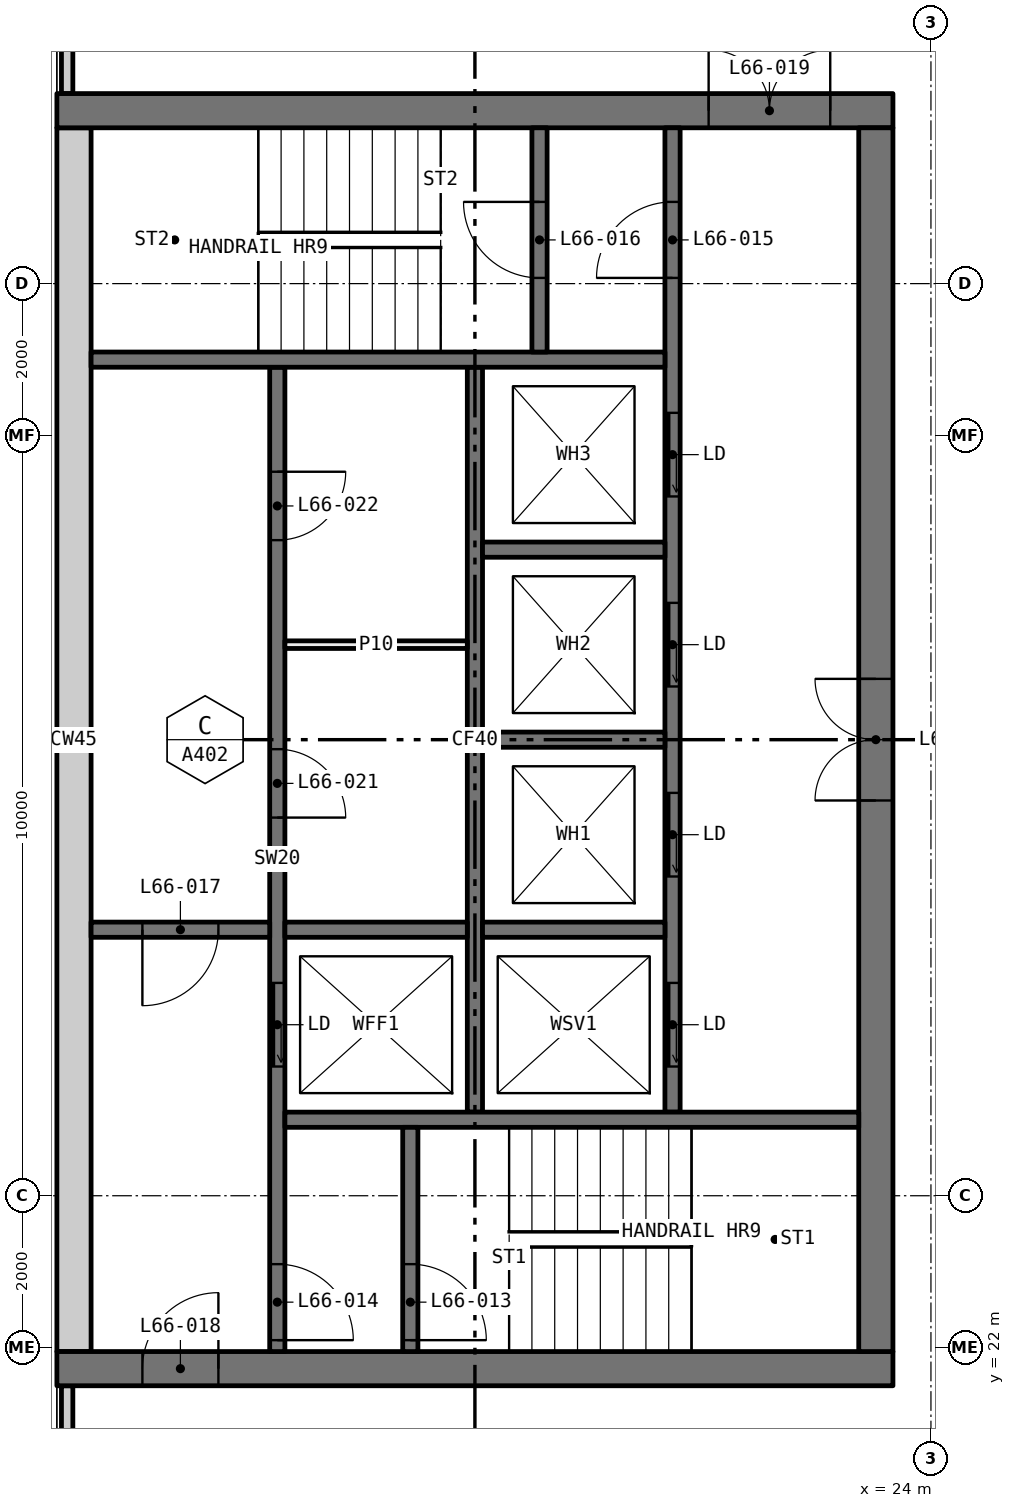
"""IFC4 building model, lengths in metres.
Left out: names, types, materials, properties, quantities, classifications, styles, units other than length and angle.
Written with IfcOpenShell. Run it as: python <this file> out.ifc"""

import sys

from ifc_helpers import new_model, si_unit, direction, frame, frame_2d, origin, place, context, subcontext, project, spatial, rectangle, extrude, element, fill, save


model = new_model("IFC4")
c1 = context("Model", 3, precision=1e-05, world=origin(), true_north=direction((0.0, 1.0)))
c2 = subcontext(c1, "Body", "Model", "MODEL_VIEW")
j1 = project(units=[si_unit("LENGTHUNIT", "METRE"), si_unit("PLANEANGLEUNIT", "RADIAN")], contexts=[c1])
p1 = place(None, origin())
s1 = spatial("IfcSite", under=j1, at=p1, CompositionType="ELEMENT")
p2 = place(p1, origin())
s2 = spatial("IfcBuilding", under=s1, at=p2, CompositionType="ELEMENT")
p3 = place(p2, frame((0.0, 0.0, 245.55)))
s3 = spatial("IfcBuildingStorey", under=s2, at=p3, CompositionType="ELEMENT", Elevation=245.55)
for number, where, z_axis, x_axis in (
    (1, (12.635, 18.71, 0.0), (0.0, 0.0, 1.0), (0.0, 1.0, 0.0)),
    (2, (12.635, 38.5, 0.0), (0.0, 0.0, 1.0), (0.0, 1.0, 0.0)),
):
    element("IfcWall", number, at=place(p3, frame(where, z_axis=z_axis, x_axis=x_axis)), inside=s3, PredefinedType="ELEMENTEDWALL", context=c2, shape_type="SweptSolid", body=[
        extrude(rectangle(XDim=2.79, YDim=0.15, at=frame_2d((1.395, 0.0))), origin(), (0.0, 0.0, 1.0), 3.05),
    ])
p4 = place(p3, frame((12.5, 21.725, 0.0), z_axis=(0.0, 0.0, 1.0), x_axis=(1.0, 0.0, 0.0)))
e3 = element("IfcWall", 3, at=p4, inside=s3, PredefinedType="SHEAR", context=c2, shape_type="SweptSolid", body=[
    extrude(rectangle(XDim=11.0, YDim=0.45, at=frame_2d((5.5, 0.0))), origin(), (0.0, 0.0, 1.0), 3.05),
])
p5 = place(p4, frame((1.125, 0.0, 0.0)))
e4 = element("IfcOpeningElement", 4, at=p5, cuts=e3, PredefinedType="OPENING", context=c2, shape_type="SweptSolid", body=[
    extrude(rectangle(XDim=1.0, YDim=2.1, at=frame_2d((0.5, 1.05))), frame((0.0, 0.235, 0.0), z_axis=(0.0, -1.0, 0.0), x_axis=(1.0, 0.0, 0.0)), (0.0, 0.0, 1.0), 0.47),
])
p6 = place(p3, frame((12.5, 38.275, 0.0), z_axis=(0.0, 0.0, 1.0), x_axis=(1.0, 0.0, 0.0)))
e5 = element("IfcWall", 5, at=p6, inside=s3, PredefinedType="SHEAR", context=c2, shape_type="SweptSolid", body=[
    extrude(rectangle(XDim=11.0, YDim=0.45, at=frame_2d((5.5, 0.0))), origin(), (0.0, 0.0, 1.0), 3.05),
])
p7 = place(p6, frame((8.575, 0.0, 0.0)))
e6 = element("IfcOpeningElement", 6, at=p7, cuts=e5, PredefinedType="OPENING", context=c2, shape_type="SweptSolid", body=[
    extrude(rectangle(XDim=1.6, YDim=2.1, at=frame_2d((0.8, 1.05))), frame((0.0, 0.235, 0.0), z_axis=(0.0, -1.0, 0.0), x_axis=(1.0, 0.0, 0.0)), (0.0, 0.0, 1.0), 0.47),
])
p8 = place(p3, frame((12.725, 21.95, 0.0), z_axis=(0.0, 0.0, 1.0), x_axis=(0.0, 1.0, 0.0)))
e7 = element("IfcWall", 7, at=p8, inside=s3, PredefinedType="SHEAR", context=c2, shape_type="SweptSolid", body=[
    extrude(rectangle(XDim=16.1, YDim=0.45, at=frame_2d((8.05, 0.0))), origin(), (0.0, 0.0, 1.0), 3.05),
])
p9 = place(p3, frame((23.275, 21.95, 0.0), z_axis=(0.0, 0.0, 1.0), x_axis=(0.0, 1.0, 0.0)))
e8 = element("IfcWall", 8, at=p9, inside=s3, PredefinedType="SHEAR", context=c2, shape_type="SweptSolid", body=[
    extrude(rectangle(XDim=16.1, YDim=0.45, at=frame_2d((8.05, 0.0))), origin(), (0.0, 0.0, 1.0), 3.05),
])
p10 = place(p9, frame((7.25, 0.0, 0.0)))
e9 = element("IfcOpeningElement", 9, at=p10, cuts=e8, PredefinedType="OPENING", context=c2, shape_type="SweptSolid", body=[
    extrude(rectangle(XDim=1.6, YDim=2.1, at=frame_2d((0.8, 1.05))), frame((0.0, 0.235, 0.0), z_axis=(0.0, -1.0, 0.0), x_axis=(1.0, 0.0, 0.0)), (0.0, 0.0, 1.0), 0.47),
])
p11 = place(p3, frame((15.4, 21.95, 0.0), z_axis=(0.0, 0.0, 1.0), x_axis=(0.0, 1.0, 0.0)))
e10 = element("IfcWall", 10, at=p11, inside=s3, PredefinedType="SOLIDWALL", context=c2, shape_type="SweptSolid", body=[
    extrude(rectangle(XDim=12.95, YDim=0.2, at=frame_2d((6.475, 0.0))), origin(), (0.0, 0.0, 1.0), 3.05),
])
p12 = place(p11, frame((3.75, 0.0, 0.0)))
e11 = element("IfcOpeningElement", 11, at=p12, cuts=e10, PredefinedType="OPENING", context=c2, shape_type="SweptSolid", body=[
    extrude(rectangle(XDim=1.1, YDim=2.1, at=frame_2d((0.55, 1.05))), frame((0.0, 0.11, 0.0), z_axis=(0.0, -1.0, 0.0), x_axis=(1.0, 0.0, 0.0)), (0.0, 0.0, 1.0), 0.22),
])
p13 = place(p11, frame((0.15, 0.0, 0.0)))
e12 = element("IfcOpeningElement", 12, at=p13, cuts=e10, PredefinedType="OPENING", context=c2, shape_type="SweptSolid", body=[
    extrude(rectangle(XDim=1.0, YDim=2.1, at=frame_2d((0.5, 1.05))), frame((0.0, 0.11, 0.0), z_axis=(0.0, -1.0, 0.0), x_axis=(1.0, 0.0, 0.0)), (0.0, 0.0, 1.0), 0.22),
])
p14 = place(p11, frame((7.025, 0.0, 0.0)))
e13 = element("IfcOpeningElement", 13, at=p14, cuts=e10, PredefinedType="OPENING", context=c2, shape_type="SweptSolid", body=[
    extrude(rectangle(XDim=0.9, YDim=2.1, at=frame_2d((0.45, 1.05))), frame((0.0, 0.11, 0.0), z_axis=(0.0, -1.0, 0.0), x_axis=(1.0, 0.0, 0.0)), (0.0, 0.0, 1.0), 0.22),
])
p15 = place(p11, frame((10.675, 0.0, 0.0)))
e14 = element("IfcOpeningElement", 14, at=p15, cuts=e10, PredefinedType="OPENING", context=c2, shape_type="SweptSolid", body=[
    extrude(rectangle(XDim=0.9, YDim=2.1, at=frame_2d((0.45, 1.05))), frame((0.0, 0.11, 0.0), z_axis=(0.0, -1.0, 0.0), x_axis=(1.0, 0.0, 0.0)), (0.0, 0.0, 1.0), 0.22),
])
p16 = place(p3, frame((20.6, 25.1, 0.0), z_axis=(0.0, 0.0, 1.0), x_axis=(0.0, 1.0, 0.0)))
e15 = element("IfcWall", 15, at=p16, inside=s3, PredefinedType="SOLIDWALL", context=c2, shape_type="SweptSolid", body=[
    extrude(rectangle(XDim=12.95, YDim=0.2, at=frame_2d((6.475, 0.0))), origin(), (0.0, 0.0, 1.0), 3.05),
])
p17 = place(p16, frame((0.6, 0.0, 0.0)))
e16 = element("IfcOpeningElement", 16, at=p17, cuts=e15, PredefinedType="OPENING", context=c2, shape_type="SweptSolid", body=[
    extrude(rectangle(XDim=1.1, YDim=2.1, at=frame_2d((0.55, 1.05))), frame((0.0, 0.11, 0.0), z_axis=(0.0, -1.0, 0.0), x_axis=(1.0, 0.0, 0.0)), (0.0, 0.0, 1.0), 0.22),
])
p18 = place(p16, frame((3.1, 0.0, 0.0)))
e17 = element("IfcOpeningElement", 17, at=p18, cuts=e15, PredefinedType="OPENING", context=c2, shape_type="SweptSolid", body=[
    extrude(rectangle(XDim=1.1, YDim=2.1, at=frame_2d((0.55, 1.05))), frame((0.0, 0.11, 0.0), z_axis=(0.0, -1.0, 0.0), x_axis=(1.0, 0.0, 0.0)), (0.0, 0.0, 1.0), 0.22),
])
p19 = place(p16, frame((5.6, 0.0, 0.0)))
e18 = element("IfcOpeningElement", 18, at=p19, cuts=e15, PredefinedType="OPENING", context=c2, shape_type="SweptSolid", body=[
    extrude(rectangle(XDim=1.1, YDim=2.1, at=frame_2d((0.55, 1.05))), frame((0.0, 0.11, 0.0), z_axis=(0.0, -1.0, 0.0), x_axis=(1.0, 0.0, 0.0)), (0.0, 0.0, 1.0), 0.22),
])
p20 = place(p16, frame((8.1, 0.0, 0.0)))
e19 = element("IfcOpeningElement", 19, at=p20, cuts=e15, PredefinedType="OPENING", context=c2, shape_type="SweptSolid", body=[
    extrude(rectangle(XDim=1.1, YDim=2.1, at=frame_2d((0.55, 1.05))), frame((0.0, 0.11, 0.0), z_axis=(0.0, -1.0, 0.0), x_axis=(1.0, 0.0, 0.0)), (0.0, 0.0, 1.0), 0.22),
])
p21 = place(p16, frame((10.975, 0.0, 0.0)))
e20 = element("IfcOpeningElement", 20, at=p21, cuts=e15, PredefinedType="OPENING", context=c2, shape_type="SweptSolid", body=[
    extrude(rectangle(XDim=1.0, YDim=2.1, at=frame_2d((0.5, 1.05))), frame((0.0, 0.11, 0.0), z_axis=(0.0, -1.0, 0.0), x_axis=(1.0, 0.0, 0.0)), (0.0, 0.0, 1.0), 0.22),
])
p22 = place(p3, frame((18.0, 25.1, 0.0), z_axis=(0.0, 0.0, 1.0), x_axis=(0.0, 1.0, 0.0)))
e21 = element("IfcWall", 21, at=p22, inside=s3, PredefinedType="SOLIDWALL", context=c2, shape_type="SweptSolid", body=[
    extrude(rectangle(XDim=9.8, YDim=0.2, at=frame_2d((4.9, 0.0))), origin(), (0.0, 0.0, 1.0), 3.05),
])
for number, where, z_axis, x_axis in (
    (22, (15.5, 25.0, 0.0), (0.0, 0.0, 1.0), (1.0, 0.0, 0.0)),
    (23, (12.95, 35.0, 0.0), (0.0, 0.0, 1.0), (1.0, 0.0, 0.0)),
):
    element("IfcWall", number, at=place(p3, frame(where, z_axis=z_axis, x_axis=x_axis)), inside=s3, PredefinedType="SOLIDWALL", context=c2, shape_type="SweptSolid", body=[
        extrude(rectangle(XDim=7.55, YDim=0.2, at=frame_2d((3.775, 0.0))), origin(), (0.0, 0.0, 1.0), 3.05),
    ])
p23 = place(p3, frame((12.95, 27.5, 0.0), z_axis=(0.0, 0.0, 1.0), x_axis=(1.0, 0.0, 0.0)))
e24 = element("IfcWall", 24, at=p23, inside=s3, PredefinedType="SOLIDWALL", context=c2, shape_type="SweptSolid", body=[
    extrude(rectangle(XDim=2.35, YDim=0.2, at=frame_2d((1.175, 0.0))), origin(), (0.0, 0.0, 1.0), 3.05),
])
p24 = place(p23, frame((0.675, 0.0, 0.0)))
e25 = element("IfcOpeningElement", 25, at=p24, cuts=e24, PredefinedType="OPENING", context=c2, shape_type="SweptSolid", body=[
    extrude(rectangle(XDim=1.0, YDim=2.1, at=frame_2d((0.5, 1.05))), frame((0.0, 0.11, 0.0), z_axis=(0.0, -1.0, 0.0), x_axis=(1.0, 0.0, 0.0)), (0.0, 0.0, 1.0), 0.22),
])
p25 = place(p3, frame((17.15, 21.95, 0.0), z_axis=(0.0, 0.0, 1.0), x_axis=(0.0, 1.0, 0.0)))
e26 = element("IfcWall", 26, at=p25, inside=s3, PredefinedType="SOLIDWALL", context=c2, shape_type="SweptSolid", body=[
    extrude(rectangle(XDim=2.95, YDim=0.2, at=frame_2d((1.475, 0.0))), origin(), (0.0, 0.0, 1.0), 3.05),
])
p26 = place(p25, frame((0.15, 0.0, 0.0)))
e27 = element("IfcOpeningElement", 27, at=p26, cuts=e26, PredefinedType="OPENING", context=c2, shape_type="SweptSolid", body=[
    extrude(rectangle(XDim=1.0, YDim=2.1, at=frame_2d((0.5, 1.05))), frame((0.0, 0.11, 0.0), z_axis=(0.0, -1.0, 0.0), x_axis=(1.0, 0.0, 0.0)), (0.0, 0.0, 1.0), 0.22),
])
p27 = place(p3, frame((18.85, 35.1, 0.0), z_axis=(0.0, 0.0, 1.0), x_axis=(0.0, 1.0, 0.0)))
e28 = element("IfcWall", 28, at=p27, inside=s3, PredefinedType="SOLIDWALL", context=c2, shape_type="SweptSolid", body=[
    extrude(rectangle(XDim=2.95, YDim=0.2, at=frame_2d((1.475, 0.0))), origin(), (0.0, 0.0, 1.0), 3.05),
])
p28 = place(p27, frame((0.975, 0.0, 0.0)))
e29 = element("IfcOpeningElement", 29, at=p28, cuts=e28, PredefinedType="OPENING", context=c2, shape_type="SweptSolid", body=[
    extrude(rectangle(XDim=1.0, YDim=2.1, at=frame_2d((0.5, 1.05))), frame((0.0, 0.11, 0.0), z_axis=(0.0, -1.0, 0.0), x_axis=(1.0, 0.0, 0.0)), (0.0, 0.0, 1.0), 0.22),
])
for number, where, z_axis, x_axis in (
    (30, (15.5, 27.5, 0.0), (0.0, 0.0, 1.0), (1.0, 0.0, 0.0)),
    (31, (18.1, 27.5, 0.0), (0.0, 0.0, 1.0), (1.0, 0.0, 0.0)),
    (32, (18.1, 30.0, 0.0), (0.0, 0.0, 1.0), (1.0, 0.0, 0.0)),
    (33, (18.1, 32.5, 0.0), (0.0, 0.0, 1.0), (1.0, 0.0, 0.0)),
):
    element("IfcWall", number, at=place(p3, frame(where, z_axis=z_axis, x_axis=x_axis)), inside=s3, PredefinedType="SOLIDWALL", context=c2, shape_type="SweptSolid", body=[
        extrude(rectangle(XDim=2.4, YDim=0.2, at=frame_2d((1.2, 0.0))), origin(), (0.0, 0.0, 1.0), 3.05),
    ])
p29 = place(p3, frame((15.5, 31.25, 0.0), z_axis=(0.0, 0.0, 1.0), x_axis=(1.0, 0.0, 0.0)))
e34 = element("IfcWall", 34, at=p29, inside=s3, PredefinedType="PARTITIONING", context=c2, shape_type="SweptSolid", body=[
    extrude(rectangle(XDim=2.4, YDim=0.1, at=frame_2d((1.2, 0.0))), origin(), (0.0, 0.0, 1.0), 3.05),
])
p30 = place(p17, origin())
e35 = element("IfcDoor", 35, at=p30, inside=s3, OperationType="SLIDING_TO_LEFT", PredefinedType="DOOR", context=c2, shape_type="SweptSolid", body=[
    extrude(rectangle(XDim=1.1, YDim=2.1, at=frame_2d((0.55, 1.05))), frame((0.0, 0.025, 0.0), z_axis=(0.0, -1.0, 0.0), x_axis=(1.0, 0.0, 0.0)), (0.0, 0.0, 1.0), 0.05),
])
fill(e16, e35)
p31 = place(p18, origin())
e36 = element("IfcDoor", 36, at=p31, inside=s3, OperationType="SLIDING_TO_LEFT", PredefinedType="DOOR", context=c2, shape_type="SweptSolid", body=[
    extrude(rectangle(XDim=1.1, YDim=2.1, at=frame_2d((0.55, 1.05))), frame((0.0, 0.025, 0.0), z_axis=(0.0, -1.0, 0.0), x_axis=(1.0, 0.0, 0.0)), (0.0, 0.0, 1.0), 0.05),
])
fill(e17, e36)
p32 = place(p19, origin())
e37 = element("IfcDoor", 37, at=p32, inside=s3, OperationType="SLIDING_TO_LEFT", PredefinedType="DOOR", context=c2, shape_type="SweptSolid", body=[
    extrude(rectangle(XDim=1.1, YDim=2.1, at=frame_2d((0.55, 1.05))), frame((0.0, 0.025, 0.0), z_axis=(0.0, -1.0, 0.0), x_axis=(1.0, 0.0, 0.0)), (0.0, 0.0, 1.0), 0.05),
])
fill(e18, e37)
p33 = place(p20, origin())
e38 = element("IfcDoor", 38, at=p33, inside=s3, OperationType="SLIDING_TO_LEFT", PredefinedType="DOOR", context=c2, shape_type="SweptSolid", body=[
    extrude(rectangle(XDim=1.1, YDim=2.1, at=frame_2d((0.55, 1.05))), frame((0.0, 0.025, 0.0), z_axis=(0.0, -1.0, 0.0), x_axis=(1.0, 0.0, 0.0)), (0.0, 0.0, 1.0), 0.05),
])
fill(e19, e38)
p34 = place(p12, origin())
e39 = element("IfcDoor", 39, at=p34, inside=s3, OperationType="SLIDING_TO_LEFT", PredefinedType="DOOR", context=c2, shape_type="SweptSolid", body=[
    extrude(rectangle(XDim=1.1, YDim=2.1, at=frame_2d((0.55, 1.05))), frame((0.0, 0.025, 0.0), z_axis=(0.0, -1.0, 0.0), x_axis=(1.0, 0.0, 0.0)), (0.0, 0.0, 1.0), 0.05),
])
fill(e11, e39)
p35 = place(p26, frame((1.0, 0.0, 0.0), x_axis=(-1.0, 0.0, 0.0)))
e40 = element("IfcDoor", 40, at=p35, inside=s3, OperationType="SINGLE_SWING_LEFT", PredefinedType="DOOR", context=c2, shape_type="SweptSolid", body=[
    extrude(rectangle(XDim=1.0, YDim=2.1, at=frame_2d((0.5, 1.05))), frame((0.0, 0.025, 0.0), z_axis=(0.0, -1.0, 0.0), x_axis=(1.0, 0.0, 0.0)), (0.0, 0.0, 1.0), 0.05),
])
fill(e27, e40)
p36 = place(p13, frame((1.0, 0.0, 0.0), x_axis=(-1.0, 0.0, 0.0)))
e41 = element("IfcDoor", 41, at=p36, inside=s3, OperationType="SINGLE_SWING_LEFT", PredefinedType="DOOR", context=c2, shape_type="SweptSolid", body=[
    extrude(rectangle(XDim=1.0, YDim=2.1, at=frame_2d((0.5, 1.05))), frame((0.0, 0.025, 0.0), z_axis=(0.0, -1.0, 0.0), x_axis=(1.0, 0.0, 0.0)), (0.0, 0.0, 1.0), 0.05),
])
fill(e12, e41)
p37 = place(p21, origin())
e42 = element("IfcDoor", 42, at=p37, inside=s3, OperationType="SINGLE_SWING_RIGHT", PredefinedType="DOOR", context=c2, shape_type="SweptSolid", body=[
    extrude(rectangle(XDim=1.0, YDim=2.1, at=frame_2d((0.5, 1.05))), frame((0.0, 0.025, 0.0), z_axis=(0.0, -1.0, 0.0), x_axis=(1.0, 0.0, 0.0)), (0.0, 0.0, 1.0), 0.05),
])
fill(e20, e42)
p38 = place(p28, origin())
e43 = element("IfcDoor", 43, at=p38, inside=s3, OperationType="SINGLE_SWING_LEFT", PredefinedType="DOOR", context=c2, shape_type="SweptSolid", body=[
    extrude(rectangle(XDim=1.0, YDim=2.1, at=frame_2d((0.5, 1.05))), frame((0.0, 0.025, 0.0), z_axis=(0.0, -1.0, 0.0), x_axis=(1.0, 0.0, 0.0)), (0.0, 0.0, 1.0), 0.05),
])
fill(e29, e43)
p39 = place(p24, frame((1.0, 0.0, 0.0), x_axis=(-1.0, 0.0, 0.0)))
e44 = element("IfcDoor", 44, at=p39, inside=s3, OperationType="SINGLE_SWING_LEFT", PredefinedType="DOOR", context=c2, shape_type="SweptSolid", body=[
    extrude(rectangle(XDim=1.0, YDim=2.1, at=frame_2d((0.5, 1.05))), frame((0.0, 0.025, 0.0), z_axis=(0.0, -1.0, 0.0), x_axis=(1.0, 0.0, 0.0)), (0.0, 0.0, 1.0), 0.05),
])
fill(e25, e44)
p40 = place(p5, origin())
e45 = element("IfcDoor", 45, at=p40, inside=s3, OperationType="SINGLE_SWING_LEFT", PredefinedType="DOOR", context=c2, shape_type="SweptSolid", body=[
    extrude(rectangle(XDim=1.0, YDim=2.1, at=frame_2d((0.5, 1.05))), frame((0.0, 0.025, 0.0), z_axis=(0.0, -1.0, 0.0), x_axis=(1.0, 0.0, 0.0)), (0.0, 0.0, 1.0), 0.05),
])
fill(e4, e45)
p41 = place(p7, origin())
e46 = element("IfcDoor", 46, at=p41, inside=s3, OperationType="DOUBLE_DOOR_SINGLE_SWING", PredefinedType="DOOR", context=c2, shape_type="SweptSolid", body=[
    extrude(rectangle(XDim=1.6, YDim=2.1, at=frame_2d((0.8, 1.05))), frame((0.0, 0.025, 0.0), z_axis=(0.0, -1.0, 0.0), x_axis=(1.0, 0.0, 0.0)), (0.0, 0.0, 1.0), 0.05),
])
fill(e6, e46)
p42 = place(p10, origin())
e47 = element("IfcDoor", 47, at=p42, inside=s3, OperationType="DOUBLE_DOOR_SINGLE_SWING", PredefinedType="DOOR", context=c2, shape_type="SweptSolid", body=[
    extrude(rectangle(XDim=1.6, YDim=2.1, at=frame_2d((0.8, 1.05))), frame((0.0, 0.025, 0.0), z_axis=(0.0, -1.0, 0.0), x_axis=(1.0, 0.0, 0.0)), (0.0, 0.0, 1.0), 0.05),
])
fill(e9, e47)
p43 = place(p14, frame((0.9, 0.0, 0.0), x_axis=(-1.0, 0.0, 0.0)))
e48 = element("IfcDoor", 48, at=p43, inside=s3, OperationType="SINGLE_SWING_LEFT", PredefinedType="DOOR", context=c2, shape_type="SweptSolid", body=[
    extrude(rectangle(XDim=0.9, YDim=2.1, at=frame_2d((0.45, 1.05))), frame((0.0, 0.025, 0.0), z_axis=(0.0, -1.0, 0.0), x_axis=(1.0, 0.0, 0.0)), (0.0, 0.0, 1.0), 0.05),
])
fill(e13, e48)
p44 = place(p15, frame((0.9, 0.0, 0.0), x_axis=(-1.0, 0.0, 0.0)))
e49 = element("IfcDoor", 49, at=p44, inside=s3, OperationType="SINGLE_SWING_RIGHT", PredefinedType="DOOR", context=c2, shape_type="SweptSolid", body=[
    extrude(rectangle(XDim=0.9, YDim=2.1, at=frame_2d((0.45, 1.05))), frame((0.0, 0.025, 0.0), z_axis=(0.0, -1.0, 0.0), x_axis=(1.0, 0.0, 0.0)), (0.0, 0.0, 1.0), 0.05),
])
fill(e14, e49)
save(model, sys.argv[1])
